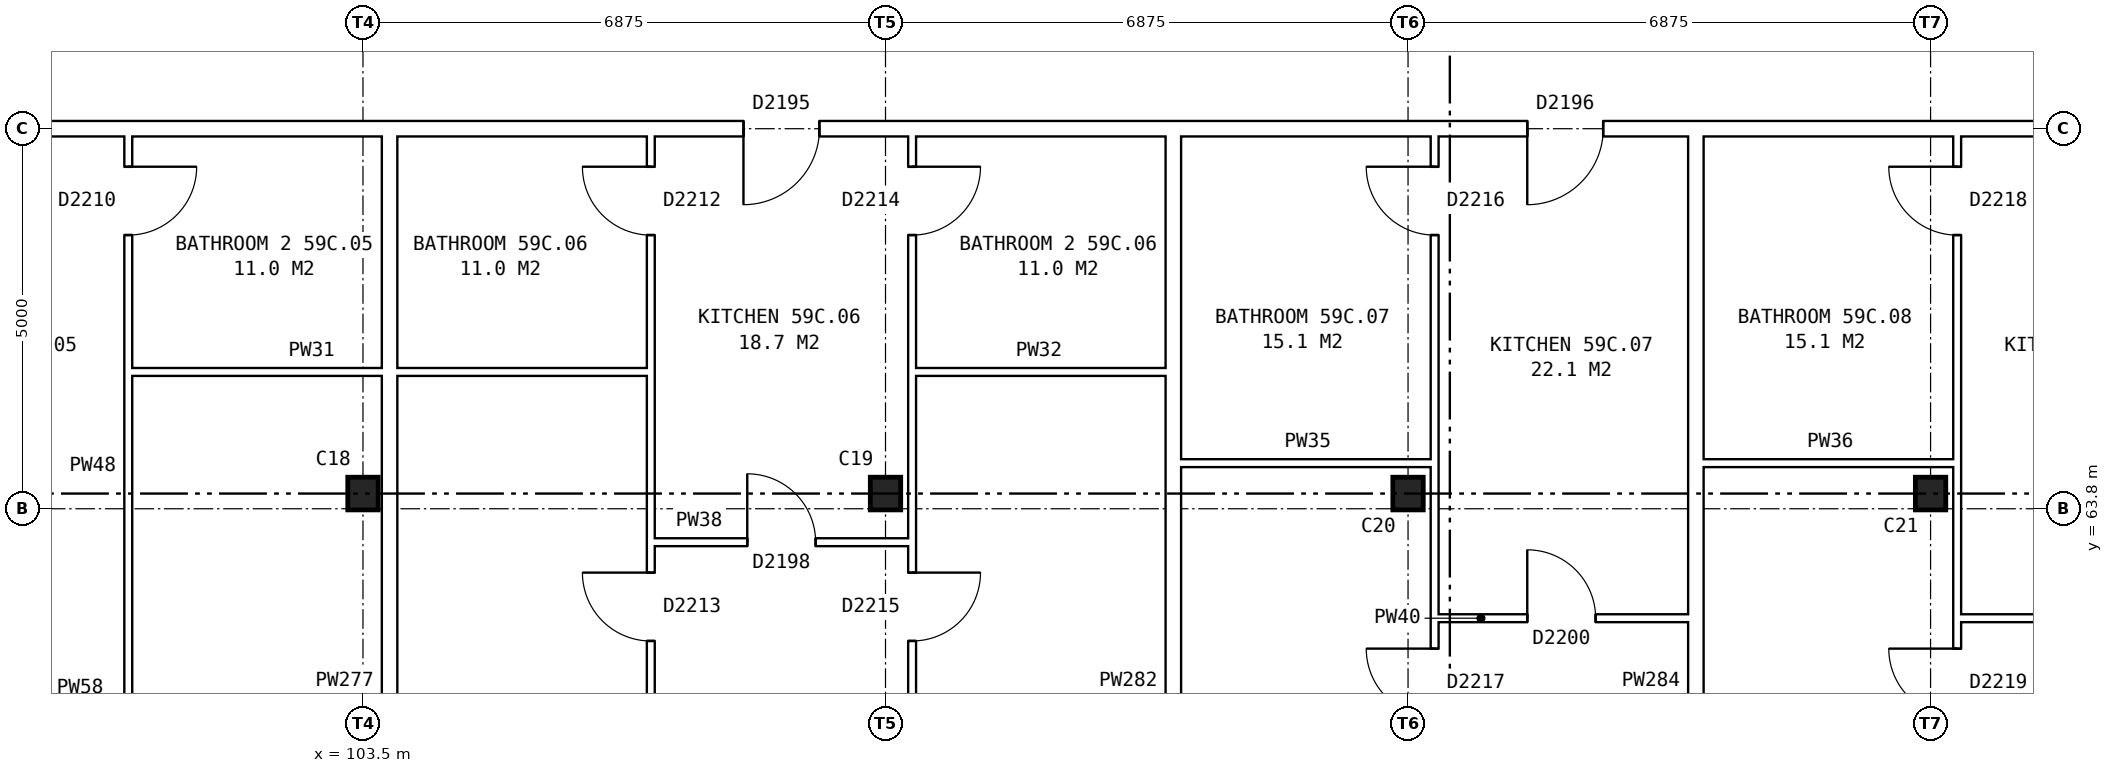
"""IFC4 building model, lengths in metres.
Left out: names, types, materials, properties, quantities, classifications, styles, units other than length and angle.
Written with IfcOpenShell. Run it as: python <this file> out.ifc"""

import sys

from ifc_helpers import new_model, si_unit, direction, frame, frame_2d, origin, origin_2d, place, context, subcontext, project, spatial, rectangle, i_section, extrude, element, fill, save


model = new_model("IFC4")
c1 = context("Model", 3, precision=1e-05, world=origin(), true_north=direction((0.0, 1.0)))
c2 = subcontext(c1, "Body", "Model", "MODEL_VIEW")
j1 = project(units=[si_unit("LENGTHUNIT", "METRE"), si_unit("PLANEANGLEUNIT", "RADIAN")], contexts=[c1])
p1 = place(None, origin())
s1 = spatial("IfcSite", under=j1, at=p1, CompositionType="ELEMENT")
p2 = place(p1, origin())
s2 = spatial("IfcBuilding", under=s1, at=p2, CompositionType="ELEMENT")
p3 = place(p2, frame((0.0, 0.0, 209.0)))
s3 = spatial("IfcBuildingStorey", under=s2, at=p3, CompositionType="ELEMENT", Elevation=209.0)
for number, where, z_axis, x_axis in (
    (1, (103.5, 64.0, 0.0), (0.0, 0.0, 1.0), (1.0, 0.0, 0.0)),
    (2, (110.375, 64.0, 0.0), (0.0, 0.0, 1.0), (1.0, 0.0, 0.0)),
    (3, (117.25, 64.0, 0.0), (0.0, 0.0, 1.0), (1.0, 0.0, 0.0)),
    (4, (124.125, 64.0, 0.0), (0.0, 0.0, 1.0), (1.0, 0.0, 0.0)),
):
    element("IfcColumn", number, at=place(p3, frame(where, z_axis=z_axis, x_axis=x_axis)), inside=s3, PredefinedType="COLUMN", context=c2, shape_type="SweptSolid", body=[
        extrude(i_section(OverallWidth=0.4, OverallDepth=0.43, WebThickness=0.04, FlangeThickness=0.04, at=origin_2d()), origin(), (0.0, 0.0, 1.0), 2.85),
    ])
p4 = place(p3, frame((117.6, 62.36, 0.0), z_axis=(0.0, 0.0, 1.0), x_axis=(1.0, 0.0, 0.0)))
e5 = element("IfcWall", 5, at=p4, inside=s3, PredefinedType="PARTITIONING", context=c2, shape_type="SweptSolid", body=[
    extrude(rectangle(XDim=3.337, YDim=0.1, at=frame_2d((1.668, 0.0))), origin(), (0.0, 0.0, 1.0), 2.85),
])
p5 = place(p4, frame((1.219, 0.0, 0.0)))
e6 = element("IfcOpeningElement", 6, at=p5, cuts=e5, PredefinedType="OPENING", context=c2, shape_type="SweptSolid", body=[
    extrude(rectangle(XDim=0.9, YDim=2.1, at=frame_2d((0.45, 1.05))), frame((0.0, 0.06, 0.0), z_axis=(0.0, -1.0, 0.0), x_axis=(1.0, 0.0, 0.0)), (0.0, 0.0, 1.0), 0.12),
])
p6 = place(p3, frame((124.475, 62.36, 0.0), z_axis=(0.0, 0.0, 1.0), x_axis=(1.0, 0.0, 0.0)))
e7 = element("IfcWall", 7, at=p6, inside=s3, PredefinedType="PARTITIONING", context=c2, shape_type="SweptSolid", body=[
    extrude(rectangle(XDim=3.437, YDim=0.1, at=frame_2d((1.719, 0.0))), origin(), (0.0, 0.0, 1.0), 2.85),
])
p7 = place(p6, frame((1.269, 0.0, 0.0)))
e8 = element("IfcOpeningElement", 8, at=p7, cuts=e7, PredefinedType="OPENING", context=c2, shape_type="SweptSolid", body=[
    extrude(rectangle(XDim=0.9, YDim=2.1, at=frame_2d((0.45, 1.05))), frame((0.0, 0.06, 0.0), z_axis=(0.0, -1.0, 0.0), x_axis=(1.0, 0.0, 0.0)), (0.0, 0.0, 1.0), 0.12),
])
p8 = place(p3, frame((107.287, 63.36, 0.0), z_axis=(0.0, 0.0, 1.0), x_axis=(1.0, 0.0, 0.0)))
e9 = element("IfcWall", 9, at=p8, inside=s3, PredefinedType="PARTITIONING", context=c2, shape_type="SweptSolid", body=[
    extrude(rectangle(XDim=3.438, YDim=0.1, at=frame_2d((1.719, 0.0))), origin(), (0.0, 0.0, 1.0), 2.85),
])
p9 = place(p8, frame((1.269, 0.0, 0.0)))
e10 = element("IfcOpeningElement", 10, at=p9, cuts=e9, PredefinedType="OPENING", context=c2, shape_type="SweptSolid", body=[
    extrude(rectangle(XDim=0.9, YDim=2.1, at=frame_2d((0.45, 1.05))), frame((0.0, 0.06, 0.0), z_axis=(0.0, -1.0, 0.0), x_axis=(1.0, 0.0, 0.0)), (0.0, 0.0, 1.0), 0.12),
])
for number, where, z_axis, x_axis in (
    (11, (114.262, 64.4, 0.0), (0.0, 0.0, 1.0), (1.0, 0.0, 0.0)),
    (12, (121.137, 64.4, 0.0), (0.0, 0.0, 1.0), (1.0, 0.0, 0.0)),
):
    element("IfcWall", number, at=place(p3, frame(where, z_axis=z_axis, x_axis=x_axis)), inside=s3, PredefinedType="PARTITIONING", context=c2, shape_type="SweptSolid", body=[
        extrude(rectangle(XDim=3.338, YDim=0.1, at=frame_2d((1.669, 0.0))), origin(), (0.0, 0.0, 1.0), 2.85),
    ])
p10 = place(p3, frame((100.412, 65.6, 0.0), z_axis=(0.0, 0.0, 1.0), x_axis=(1.0, 0.0, 0.0)))
e13 = element("IfcWall", 13, at=p10, inside=s3, PredefinedType="PARTITIONING", context=c2, shape_type="SweptSolid", body=[
    extrude(rectangle(XDim=6.875, YDim=0.1, at=frame_2d((3.438, 0.0))), origin(), (0.0, 0.0, 1.0), 2.85),
])
p11 = place(p3, frame((110.725, 65.6, 0.0), z_axis=(0.0, 0.0, 1.0), x_axis=(1.0, 0.0, 0.0)))
e14 = element("IfcWall", 14, at=p11, inside=s3, PredefinedType="PARTITIONING", context=c2, shape_type="SweptSolid", body=[
    extrude(rectangle(XDim=3.337, YDim=0.1, at=frame_2d((1.668, 0.0))), origin(), (0.0, 0.0, 1.0), 2.85),
])
p12 = place(p3, frame((75.64, 68.8, 0.0), z_axis=(0.0, 0.0, 1.0), x_axis=(1.0, 0.0, 0.0)))
e15 = element("IfcWall", 15, at=p12, inside=s3, PredefinedType="PARTITIONING", context=c2, shape_type="SweptSolid", body=[
    extrude(rectangle(XDim=55.72, YDim=0.2, at=frame_2d((27.86, 0.0))), origin(), (0.0, 0.0, 1.0), 2.85),
])
p13 = place(p12, frame((5.191, 0.0, 0.0)))
e16 = element("IfcOpeningElement", 16, at=p13, cuts=e15, PredefinedType="OPENING", context=c2, shape_type="SweptSolid", body=[
    extrude(rectangle(XDim=1.0, YDim=2.1, at=frame_2d((0.5, 1.05))), frame((0.0, 0.11, 0.0), z_axis=(0.0, -1.0, 0.0), x_axis=(1.0, 0.0, 0.0)), (0.0, 0.0, 1.0), 0.22),
])
p14 = place(p12, frame((15.678, 0.0, 0.0)))
e17 = element("IfcOpeningElement", 17, at=p14, cuts=e15, PredefinedType="OPENING", context=c2, shape_type="SweptSolid", body=[
    extrude(rectangle(XDim=1.0, YDim=2.1, at=frame_2d((0.5, 1.05))), frame((0.0, 0.11, 0.0), z_axis=(0.0, -1.0, 0.0), x_axis=(1.0, 0.0, 0.0)), (0.0, 0.0, 1.0), 0.22),
])
p15 = place(p12, frame((22.553, 0.0, 0.0)))
e18 = element("IfcOpeningElement", 18, at=p15, cuts=e15, PredefinedType="OPENING", context=c2, shape_type="SweptSolid", body=[
    extrude(rectangle(XDim=1.0, YDim=2.1, at=frame_2d((0.5, 1.05))), frame((0.0, 0.11, 0.0), z_axis=(0.0, -1.0, 0.0), x_axis=(1.0, 0.0, 0.0)), (0.0, 0.0, 1.0), 0.22),
])
p16 = place(p12, frame((32.866, 0.0, 0.0)))
e19 = element("IfcOpeningElement", 19, at=p16, cuts=e15, PredefinedType="OPENING", context=c2, shape_type="SweptSolid", body=[
    extrude(rectangle(XDim=1.0, YDim=2.1, at=frame_2d((0.5, 1.05))), frame((0.0, 0.11, 0.0), z_axis=(0.0, -1.0, 0.0), x_axis=(1.0, 0.0, 0.0)), (0.0, 0.0, 1.0), 0.22),
])
p17 = place(p12, frame((43.178, 0.0, 0.0)))
e20 = element("IfcOpeningElement", 20, at=p17, cuts=e15, PredefinedType="OPENING", context=c2, shape_type="SweptSolid", body=[
    extrude(rectangle(XDim=1.0, YDim=2.1, at=frame_2d((0.5, 1.05))), frame((0.0, 0.11, 0.0), z_axis=(0.0, -1.0, 0.0), x_axis=(1.0, 0.0, 0.0)), (0.0, 0.0, 1.0), 0.22),
])
p18 = place(p12, frame((50.053, 0.0, 0.0)))
e21 = element("IfcOpeningElement", 21, at=p18, cuts=e15, PredefinedType="OPENING", context=c2, shape_type="SweptSolid", body=[
    extrude(rectangle(XDim=1.0, YDim=2.1, at=frame_2d((0.5, 1.05))), frame((0.0, 0.11, 0.0), z_axis=(0.0, -1.0, 0.0), x_axis=(1.0, 0.0, 0.0)), (0.0, 0.0, 1.0), 0.22),
])
p19 = place(p3, frame((100.412, 54.36, 0.0), z_axis=(0.0, 0.0, 1.0), x_axis=(0.0, 1.0, 0.0)))
e22 = element("IfcWall", 22, at=p19, inside=s3, PredefinedType="PARTITIONING", context=c2, shape_type="SweptSolid", body=[
    extrude(rectangle(XDim=14.34, YDim=0.1, at=frame_2d((7.17, 0.0))), origin(), (0.0, 0.0, 1.0), 2.85),
])
p20 = place(p19, frame((5.5, 0.0, 0.0)))
e23 = element("IfcOpeningElement", 23, at=p20, cuts=e22, PredefinedType="OPENING", context=c2, shape_type="SweptSolid", body=[
    extrude(rectangle(XDim=0.9, YDim=2.1, at=frame_2d((0.45, 1.05))), frame((0.0, 0.06, 0.0), z_axis=(0.0, -1.0, 0.0), x_axis=(1.0, 0.0, 0.0)), (0.0, 0.0, 1.0), 0.12),
])
p21 = place(p19, frame((13.04, 0.0, 0.0)))
e24 = element("IfcOpeningElement", 24, at=p21, cuts=e22, PredefinedType="OPENING", context=c2, shape_type="SweptSolid", body=[
    extrude(rectangle(XDim=0.9, YDim=2.1, at=frame_2d((0.45, 1.05))), frame((0.0, 0.06, 0.0), z_axis=(0.0, -1.0, 0.0), x_axis=(1.0, 0.0, 0.0)), (0.0, 0.0, 1.0), 0.12),
])
p22 = place(p3, frame((103.85, 54.36, 0.0), z_axis=(0.0, 0.0, 1.0), x_axis=(0.0, 1.0, 0.0)))
e25 = element("IfcWall", 25, at=p22, inside=s3, PredefinedType="PARTITIONING", context=c2, shape_type="SweptSolid", body=[
    extrude(rectangle(XDim=14.34, YDim=0.2, at=frame_2d((7.17, 0.0))), origin(), (0.0, 0.0, 1.0), 2.85),
])
p23 = place(p3, frame((107.287, 54.36, 0.0), z_axis=(0.0, 0.0, 1.0), x_axis=(0.0, 1.0, 0.0)))
e26 = element("IfcWall", 26, at=p23, inside=s3, PredefinedType="PARTITIONING", context=c2, shape_type="SweptSolid", body=[
    extrude(rectangle(XDim=14.34, YDim=0.1, at=frame_2d((7.17, 0.0))), origin(), (0.0, 0.0, 1.0), 2.85),
])
p24 = place(p23, frame((7.7, 0.0, 0.0)))
e27 = element("IfcOpeningElement", 27, at=p24, cuts=e26, PredefinedType="OPENING", context=c2, shape_type="SweptSolid", body=[
    extrude(rectangle(XDim=0.9, YDim=2.1, at=frame_2d((0.45, 1.05))), frame((0.0, 0.06, 0.0), z_axis=(0.0, -1.0, 0.0), x_axis=(1.0, 0.0, 0.0)), (0.0, 0.0, 1.0), 0.12),
])
p25 = place(p23, frame((13.04, 0.0, 0.0)))
e28 = element("IfcOpeningElement", 28, at=p25, cuts=e26, PredefinedType="OPENING", context=c2, shape_type="SweptSolid", body=[
    extrude(rectangle(XDim=0.9, YDim=2.1, at=frame_2d((0.45, 1.05))), frame((0.0, 0.06, 0.0), z_axis=(0.0, -1.0, 0.0), x_axis=(1.0, 0.0, 0.0)), (0.0, 0.0, 1.0), 0.12),
])
p26 = place(p3, frame((110.725, 54.36, 0.0), z_axis=(0.0, 0.0, 1.0), x_axis=(0.0, 1.0, 0.0)))
e29 = element("IfcWall", 29, at=p26, inside=s3, PredefinedType="PARTITIONING", context=c2, shape_type="SweptSolid", body=[
    extrude(rectangle(XDim=14.34, YDim=0.1, at=frame_2d((7.17, 0.0))), origin(), (0.0, 0.0, 1.0), 2.85),
])
p27 = place(p26, frame((7.7, 0.0, 0.0)))
e30 = element("IfcOpeningElement", 30, at=p27, cuts=e29, PredefinedType="OPENING", context=c2, shape_type="SweptSolid", body=[
    extrude(rectangle(XDim=0.9, YDim=2.1, at=frame_2d((0.45, 1.05))), frame((0.0, 0.06, 0.0), z_axis=(0.0, -1.0, 0.0), x_axis=(1.0, 0.0, 0.0)), (0.0, 0.0, 1.0), 0.12),
])
p28 = place(p26, frame((13.04, 0.0, 0.0)))
e31 = element("IfcOpeningElement", 31, at=p28, cuts=e29, PredefinedType="OPENING", context=c2, shape_type="SweptSolid", body=[
    extrude(rectangle(XDim=0.9, YDim=2.1, at=frame_2d((0.45, 1.05))), frame((0.0, 0.06, 0.0), z_axis=(0.0, -1.0, 0.0), x_axis=(1.0, 0.0, 0.0)), (0.0, 0.0, 1.0), 0.12),
])
p29 = place(p3, frame((114.162, 54.36, 0.0), z_axis=(0.0, 0.0, 1.0), x_axis=(0.0, 1.0, 0.0)))
e32 = element("IfcWall", 32, at=p29, inside=s3, PredefinedType="PARTITIONING", context=c2, shape_type="SweptSolid", body=[
    extrude(rectangle(XDim=14.34, YDim=0.2, at=frame_2d((7.17, 0.0))), origin(), (0.0, 0.0, 1.0), 2.85),
])
p30 = place(p3, frame((117.6, 54.36, 0.0), z_axis=(0.0, 0.0, 1.0), x_axis=(0.0, 1.0, 0.0)))
e33 = element("IfcWall", 33, at=p30, inside=s3, PredefinedType="PARTITIONING", context=c2, shape_type="SweptSolid", body=[
    extrude(rectangle(XDim=14.34, YDim=0.1, at=frame_2d((7.17, 0.0))), origin(), (0.0, 0.0, 1.0), 2.85),
])
p31 = place(p30, frame((6.7, 0.0, 0.0)))
e34 = element("IfcOpeningElement", 34, at=p31, cuts=e33, PredefinedType="OPENING", context=c2, shape_type="SweptSolid", body=[
    extrude(rectangle(XDim=0.9, YDim=2.1, at=frame_2d((0.45, 1.05))), frame((0.0, 0.06, 0.0), z_axis=(0.0, -1.0, 0.0), x_axis=(1.0, 0.0, 0.0)), (0.0, 0.0, 1.0), 0.12),
])
p32 = place(p30, frame((13.04, 0.0, 0.0)))
e35 = element("IfcOpeningElement", 35, at=p32, cuts=e33, PredefinedType="OPENING", context=c2, shape_type="SweptSolid", body=[
    extrude(rectangle(XDim=0.9, YDim=2.1, at=frame_2d((0.45, 1.05))), frame((0.0, 0.06, 0.0), z_axis=(0.0, -1.0, 0.0), x_axis=(1.0, 0.0, 0.0)), (0.0, 0.0, 1.0), 0.12),
])
p33 = place(p3, frame((121.037, 54.36, 0.0), z_axis=(0.0, 0.0, 1.0), x_axis=(0.0, 1.0, 0.0)))
e36 = element("IfcWall", 36, at=p33, inside=s3, PredefinedType="PARTITIONING", context=c2, shape_type="SweptSolid", body=[
    extrude(rectangle(XDim=14.34, YDim=0.2, at=frame_2d((7.17, 0.0))), origin(), (0.0, 0.0, 1.0), 2.85),
])
p34 = place(p3, frame((124.475, 54.36, 0.0), z_axis=(0.0, 0.0, 1.0), x_axis=(0.0, 1.0, 0.0)))
e37 = element("IfcWall", 37, at=p34, inside=s3, PredefinedType="PARTITIONING", context=c2, shape_type="SweptSolid", body=[
    extrude(rectangle(XDim=14.34, YDim=0.1, at=frame_2d((7.17, 0.0))), origin(), (0.0, 0.0, 1.0), 2.85),
])
p35 = place(p34, frame((6.7, 0.0, 0.0)))
e38 = element("IfcOpeningElement", 38, at=p35, cuts=e37, PredefinedType="OPENING", context=c2, shape_type="SweptSolid", body=[
    extrude(rectangle(XDim=0.9, YDim=2.1, at=frame_2d((0.45, 1.05))), frame((0.0, 0.06, 0.0), z_axis=(0.0, -1.0, 0.0), x_axis=(1.0, 0.0, 0.0)), (0.0, 0.0, 1.0), 0.12),
])
p36 = place(p34, frame((13.04, 0.0, 0.0)))
e39 = element("IfcOpeningElement", 39, at=p36, cuts=e37, PredefinedType="OPENING", context=c2, shape_type="SweptSolid", body=[
    extrude(rectangle(XDim=0.9, YDim=2.1, at=frame_2d((0.45, 1.05))), frame((0.0, 0.06, 0.0), z_axis=(0.0, -1.0, 0.0), x_axis=(1.0, 0.0, 0.0)), (0.0, 0.0, 1.0), 0.12),
])
p37 = place(p21, frame((0.9, 0.0, 0.0), z_axis=(0.0, 0.0, 1.0), x_axis=(-1.0, 0.0, 0.0)))
e40 = element("IfcDoor", 40, at=p37, inside=s3, OperationType="SINGLE_SWING_LEFT", PredefinedType="DOOR", context=c2, shape_type="SweptSolid", body=[
    extrude(rectangle(XDim=0.9, YDim=2.1, at=frame_2d((0.45, 1.05))), frame((0.0, 0.025, 0.0), z_axis=(0.0, -1.0, 0.0), x_axis=(1.0, 0.0, 0.0)), (0.0, 0.0, 1.0), 0.05),
])
fill(e24, e40)
p38 = place(p24, origin())
e41 = element("IfcDoor", 41, at=p38, inside=s3, OperationType="SINGLE_SWING_RIGHT", PredefinedType="DOOR", context=c2, shape_type="SweptSolid", body=[
    extrude(rectangle(XDim=0.9, YDim=2.1, at=frame_2d((0.45, 1.05))), frame((0.0, 0.025, 0.0), z_axis=(0.0, -1.0, 0.0), x_axis=(1.0, 0.0, 0.0)), (0.0, 0.0, 1.0), 0.05),
])
fill(e27, e41)
p39 = place(p27, frame((0.9, 0.0, 0.0), z_axis=(0.0, 0.0, 1.0), x_axis=(-1.0, 0.0, 0.0)))
e42 = element("IfcDoor", 42, at=p39, inside=s3, OperationType="SINGLE_SWING_LEFT", PredefinedType="DOOR", context=c2, shape_type="SweptSolid", body=[
    extrude(rectangle(XDim=0.9, YDim=2.1, at=frame_2d((0.45, 1.05))), frame((0.0, 0.025, 0.0), z_axis=(0.0, -1.0, 0.0), x_axis=(1.0, 0.0, 0.0)), (0.0, 0.0, 1.0), 0.05),
])
fill(e30, e42)
p40 = place(p16, frame((1.0, 0.0, 0.0), z_axis=(0.0, 0.0, 1.0), x_axis=(-1.0, 0.0, 0.0)))
e43 = element("IfcDoor", 43, at=p40, inside=s3, OperationType="SINGLE_SWING_RIGHT", PredefinedType="DOOR", context=c2, shape_type="SweptSolid", body=[
    extrude(rectangle(XDim=1.0, YDim=2.1, at=frame_2d((0.5, 1.05))), frame((0.0, 0.025, 0.0), z_axis=(0.0, -1.0, 0.0), x_axis=(1.0, 0.0, 0.0)), (0.0, 0.0, 1.0), 0.05),
])
fill(e19, e43)
p41 = place(p9, origin())
e44 = element("IfcDoor", 44, at=p41, inside=s3, OperationType="SINGLE_SWING_LEFT", PredefinedType="DOOR", context=c2, shape_type="SweptSolid", body=[
    extrude(rectangle(XDim=0.9, YDim=2.1, at=frame_2d((0.45, 1.05))), frame((0.0, 0.025, 0.0), z_axis=(0.0, -1.0, 0.0), x_axis=(1.0, 0.0, 0.0)), (0.0, 0.0, 1.0), 0.05),
])
fill(e10, e44)
p42 = place(p25, origin())
e45 = element("IfcDoor", 45, at=p42, inside=s3, OperationType="SINGLE_SWING_RIGHT", PredefinedType="DOOR", context=c2, shape_type="SweptSolid", body=[
    extrude(rectangle(XDim=0.9, YDim=2.1, at=frame_2d((0.45, 1.05))), frame((0.0, 0.025, 0.0), z_axis=(0.0, -1.0, 0.0), x_axis=(1.0, 0.0, 0.0)), (0.0, 0.0, 1.0), 0.05),
])
fill(e28, e45)
p43 = place(p28, frame((0.9, 0.0, 0.0), z_axis=(0.0, 0.0, 1.0), x_axis=(-1.0, 0.0, 0.0)))
e46 = element("IfcDoor", 46, at=p43, inside=s3, OperationType="SINGLE_SWING_LEFT", PredefinedType="DOOR", context=c2, shape_type="SweptSolid", body=[
    extrude(rectangle(XDim=0.9, YDim=2.1, at=frame_2d((0.45, 1.05))), frame((0.0, 0.025, 0.0), z_axis=(0.0, -1.0, 0.0), x_axis=(1.0, 0.0, 0.0)), (0.0, 0.0, 1.0), 0.05),
])
fill(e31, e46)
p44 = place(p31, origin())
e47 = element("IfcDoor", 47, at=p44, inside=s3, OperationType="SINGLE_SWING_RIGHT", PredefinedType="DOOR", context=c2, shape_type="SweptSolid", body=[
    extrude(rectangle(XDim=0.9, YDim=2.1, at=frame_2d((0.45, 1.05))), frame((0.0, 0.025, 0.0), z_axis=(0.0, -1.0, 0.0), x_axis=(1.0, 0.0, 0.0)), (0.0, 0.0, 1.0), 0.05),
])
fill(e34, e47)
p45 = place(p17, frame((1.0, 0.0, 0.0), z_axis=(0.0, 0.0, 1.0), x_axis=(-1.0, 0.0, 0.0)))
e48 = element("IfcDoor", 48, at=p45, inside=s3, OperationType="SINGLE_SWING_RIGHT", PredefinedType="DOOR", context=c2, shape_type="SweptSolid", body=[
    extrude(rectangle(XDim=1.0, YDim=2.1, at=frame_2d((0.5, 1.05))), frame((0.0, 0.025, 0.0), z_axis=(0.0, -1.0, 0.0), x_axis=(1.0, 0.0, 0.0)), (0.0, 0.0, 1.0), 0.05),
])
fill(e20, e48)
p46 = place(p5, origin())
e49 = element("IfcDoor", 49, at=p46, inside=s3, OperationType="SINGLE_SWING_LEFT", PredefinedType="DOOR", context=c2, shape_type="SweptSolid", body=[
    extrude(rectangle(XDim=0.9, YDim=2.1, at=frame_2d((0.45, 1.05))), frame((0.0, 0.025, 0.0), z_axis=(0.0, -1.0, 0.0), x_axis=(1.0, 0.0, 0.0)), (0.0, 0.0, 1.0), 0.05),
])
fill(e6, e49)
p47 = place(p32, origin())
e50 = element("IfcDoor", 50, at=p47, inside=s3, OperationType="SINGLE_SWING_RIGHT", PredefinedType="DOOR", context=c2, shape_type="SweptSolid", body=[
    extrude(rectangle(XDim=0.9, YDim=2.1, at=frame_2d((0.45, 1.05))), frame((0.0, 0.025, 0.0), z_axis=(0.0, -1.0, 0.0), x_axis=(1.0, 0.0, 0.0)), (0.0, 0.0, 1.0), 0.05),
])
fill(e35, e50)
p48 = place(p35, origin())
e51 = element("IfcDoor", 51, at=p48, inside=s3, OperationType="SINGLE_SWING_RIGHT", PredefinedType="DOOR", context=c2, shape_type="SweptSolid", body=[
    extrude(rectangle(XDim=0.9, YDim=2.1, at=frame_2d((0.45, 1.05))), frame((0.0, 0.025, 0.0), z_axis=(0.0, -1.0, 0.0), x_axis=(1.0, 0.0, 0.0)), (0.0, 0.0, 1.0), 0.05),
])
fill(e38, e51)
p49 = place(p36, origin())
e52 = element("IfcDoor", 52, at=p49, inside=s3, OperationType="SINGLE_SWING_RIGHT", PredefinedType="DOOR", context=c2, shape_type="SweptSolid", body=[
    extrude(rectangle(XDim=0.9, YDim=2.1, at=frame_2d((0.45, 1.05))), frame((0.0, 0.025, 0.0), z_axis=(0.0, -1.0, 0.0), x_axis=(1.0, 0.0, 0.0)), (0.0, 0.0, 1.0), 0.05),
])
fill(e39, e52)
save(model, sys.argv[1])
